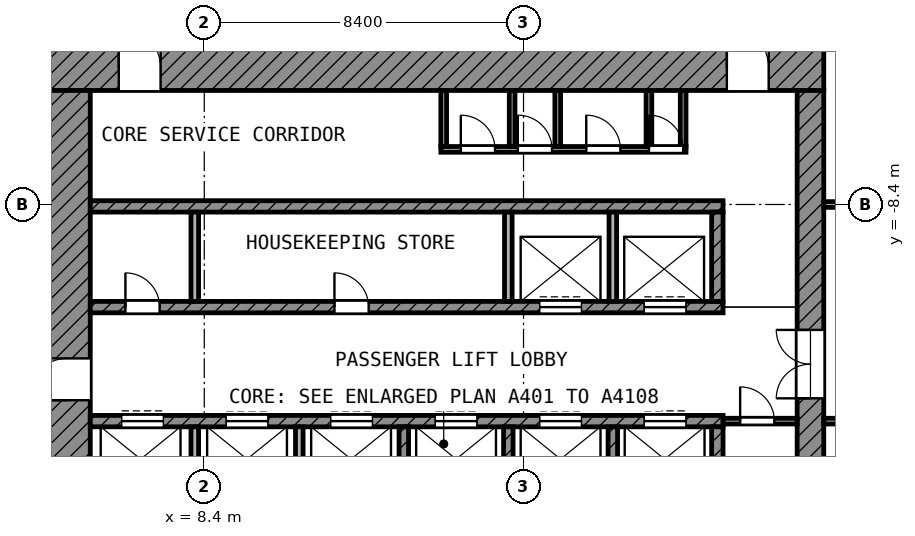
"""IFC4 building model, lengths in metres.
Left out: names, types, materials, properties, quantities, classifications, styles, units other than length and angle.
Written with IfcOpenShell. Run it as: python <this file> out.ifc"""

import sys

from ifc_helpers import new_model, si_unit, direction, frame, frame_2d, origin, place, context, subcontext, project, spatial, rectangle, extrude, element, fill, save


model = new_model("IFC4")
c1 = context("Model", 3, precision=1e-05, world=origin(), true_north=direction((0.0, 1.0)))
c2 = subcontext(c1, "Body", "Model", "MODEL_VIEW")
j1 = project(units=[si_unit("LENGTHUNIT", "METRE"), si_unit("PLANEANGLEUNIT", "RADIAN")], contexts=[c1])
p1 = place(None, origin())
s1 = spatial("IfcSite", under=j1, at=p1, CompositionType="ELEMENT")
p2 = place(p1, origin())
s2 = spatial("IfcBuilding", under=s1, at=p2, CompositionType="ELEMENT")
p3 = place(p2, frame((0.0, 0.0, 277.6)))
s3 = spatial("IfcBuildingStorey", under=s2, at=p3, CompositionType="ELEMENT", Elevation=277.6)
p4 = place(p3, frame((4.2, -4.8, 0.0), z_axis=(0.0, 0.0, 1.0), x_axis=(1.0, 0.0, 0.0)))
e1 = element("IfcWall", 1, at=p4, inside=s3, PredefinedType="SHEAR", context=c2, shape_type="SweptSolid", body=[
    extrude(rectangle(XDim=20.5, YDim=1.2, at=frame_2d((10.25, 0.0))), origin(), (0.0, 0.0, 1.0), 3.6),
])
p5 = place(p4, frame((1.95, 0.0, 0.0)))
e2 = element("IfcOpeningElement", 2, at=p5, cuts=e1, PredefinedType="OPENING", context=c2, shape_type="SweptSolid", body=[
    extrude(rectangle(XDim=1.1, YDim=2.1, at=frame_2d((0.55, 1.05))), frame((0.0, 0.61, 0.0), z_axis=(0.0, -1.0, 0.0), x_axis=(1.0, 0.0, 0.0)), (0.0, 0.0, 1.0), 1.22),
])
p6 = place(p4, frame((17.95, 0.0, 0.0)))
e3 = element("IfcOpeningElement", 3, at=p6, cuts=e1, PredefinedType="OPENING", context=c2, shape_type="SweptSolid", body=[
    extrude(rectangle(XDim=1.1, YDim=2.1, at=frame_2d((0.55, 1.05))), frame((0.0, 0.61, 0.0), z_axis=(0.0, -1.0, 0.0), x_axis=(1.0, 0.0, 0.0)), (0.0, 0.0, 1.0), 1.22),
])
p7 = place(p3, frame((4.8, -24.7, 0.0), z_axis=(0.0, 0.0, 1.0), x_axis=(0.0, 1.0, 0.0)))
e4 = element("IfcWall", 4, at=p7, inside=s3, PredefinedType="SHEAR", context=c2, shape_type="SweptSolid", body=[
    extrude(rectangle(XDim=19.3, YDim=1.2, at=frame_2d((9.65, 0.0))), origin(), (0.0, 0.0, 1.0), 3.6),
])
p8 = place(p7, frame((11.15, 0.0, 0.0)))
e5 = element("IfcOpeningElement", 5, at=p8, cuts=e4, PredefinedType="OPENING", context=c2, shape_type="SweptSolid", body=[
    extrude(rectangle(XDim=1.1, YDim=2.1, at=frame_2d((0.55, 1.05))), frame((0.0, 0.61, 0.0), z_axis=(0.0, -1.0, 0.0), x_axis=(1.0, 0.0, 0.0)), (0.0, 0.0, 1.0), 1.22),
])
p9 = place(p7, frame((1.85, 0.0, 0.0)))
e6 = element("IfcOpeningElement", 6, at=p9, cuts=e4, PredefinedType="OPENING", context=c2, shape_type="SweptSolid", body=[
    extrude(rectangle(XDim=1.1, YDim=2.1, at=frame_2d((0.55, 1.05))), frame((0.0, 0.61, 0.0), z_axis=(0.0, -1.0, 0.0), x_axis=(1.0, 0.0, 0.0)), (0.0, 0.0, 1.0), 1.22),
])
p10 = place(p3, frame((24.35, -24.0, 0.0), z_axis=(0.0, 0.0, 1.0), x_axis=(0.0, 1.0, 0.0)))
e7 = element("IfcWall", 7, at=p10, inside=s3, PredefinedType="SHEAR", context=c2, shape_type="SweptSolid", body=[
    extrude(rectangle(XDim=18.6, YDim=0.7, at=frame_2d((9.3, 0.0))), origin(), (0.0, 0.0, 1.0), 3.6),
])
p11 = place(p10, frame((10.5, 0.0, 0.0)))
e8 = element("IfcOpeningElement", 8, at=p11, cuts=e7, PredefinedType="OPENING", context=c2, shape_type="SweptSolid", body=[
    extrude(rectangle(XDim=1.8, YDim=2.1, at=frame_2d((0.9, 1.05))), frame((0.0, 0.36, 0.0), z_axis=(0.0, -1.0, 0.0), x_axis=(1.0, 0.0, 0.0)), (0.0, 0.0, 1.0), 0.72),
])
p12 = place(p3, frame((5.4, -8.45, 0.0), z_axis=(0.0, 0.0, 1.0), x_axis=(1.0, 0.0, 0.0)))
e9 = element("IfcWall", 9, at=p12, inside=s3, PredefinedType="SHEAR", context=c2, shape_type="SweptSolid", body=[
    extrude(rectangle(XDim=16.65, YDim=0.3, at=frame_2d((8.325, 0.0))), origin(), (0.0, 0.0, 1.0), 3.6),
])
p13 = place(p3, frame((5.4, -11.1, 0.0), z_axis=(0.0, 0.0, 1.0), x_axis=(1.0, 0.0, 0.0)))
e10 = element("IfcWall", 10, at=p13, inside=s3, PredefinedType="SHEAR", context=c2, shape_type="SweptSolid", body=[
    extrude(rectangle(XDim=16.65, YDim=0.3, at=frame_2d((8.325, 0.0))), origin(), (0.0, 0.0, 1.0), 3.6),
])
p14 = place(p13, frame((11.825, 0.0, 0.0)))
e11 = element("IfcOpeningElement", 11, at=p14, cuts=e10, PredefinedType="OPENING", context=c2, shape_type="SweptSolid", body=[
    extrude(rectangle(XDim=1.1, YDim=2.1, at=frame_2d((0.55, 1.05))), frame((0.0, 0.16, 0.0), z_axis=(0.0, -1.0, 0.0), x_axis=(1.0, 0.0, 0.0)), (0.0, 0.0, 1.0), 0.32),
])
p15 = place(p13, frame((14.575, 0.0, 0.0)))
e12 = element("IfcOpeningElement", 12, at=p15, cuts=e10, PredefinedType="OPENING", context=c2, shape_type="SweptSolid", body=[
    extrude(rectangle(XDim=1.1, YDim=2.1, at=frame_2d((0.55, 1.05))), frame((0.0, 0.16, 0.0), z_axis=(0.0, -1.0, 0.0), x_axis=(1.0, 0.0, 0.0)), (0.0, 0.0, 1.0), 0.32),
])
p16 = place(p13, frame((0.925, 0.0, 0.0)))
e13 = element("IfcOpeningElement", 13, at=p16, cuts=e10, PredefinedType="OPENING", context=c2, shape_type="SweptSolid", body=[
    extrude(rectangle(XDim=0.9, YDim=2.1, at=frame_2d((0.45, 1.05))), frame((0.0, 0.16, 0.0), z_axis=(0.0, -1.0, 0.0), x_axis=(1.0, 0.0, 0.0)), (0.0, 0.0, 1.0), 0.32),
])
p17 = place(p13, frame((6.425, 0.0, 0.0)))
e14 = element("IfcOpeningElement", 14, at=p17, cuts=e10, PredefinedType="OPENING", context=c2, shape_type="SweptSolid", body=[
    extrude(rectangle(XDim=0.9, YDim=2.1, at=frame_2d((0.45, 1.05))), frame((0.0, 0.16, 0.0), z_axis=(0.0, -1.0, 0.0), x_axis=(1.0, 0.0, 0.0)), (0.0, 0.0, 1.0), 0.32),
])
p18 = place(p3, frame((5.4, -14.1, 0.0), z_axis=(0.0, 0.0, 1.0), x_axis=(1.0, 0.0, 0.0)))
e15 = element("IfcWall", 15, at=p18, inside=s3, PredefinedType="SHEAR", context=c2, shape_type="SweptSolid", body=[
    extrude(rectangle(XDim=16.65, YDim=0.3, at=frame_2d((8.325, 0.0))), origin(), (0.0, 0.0, 1.0), 3.6),
])
p19 = place(p18, frame((0.825, 0.0, 0.0)))
e16 = element("IfcOpeningElement", 16, at=p19, cuts=e15, PredefinedType="OPENING", context=c2, shape_type="SweptSolid", body=[
    extrude(rectangle(XDim=1.1, YDim=2.1, at=frame_2d((0.55, 1.05))), frame((0.0, 0.16, 0.0), z_axis=(0.0, -1.0, 0.0), x_axis=(1.0, 0.0, 0.0)), (0.0, 0.0, 1.0), 0.32),
])
p20 = place(p18, frame((3.575, 0.0, 0.0)))
e17 = element("IfcOpeningElement", 17, at=p20, cuts=e15, PredefinedType="OPENING", context=c2, shape_type="SweptSolid", body=[
    extrude(rectangle(XDim=1.1, YDim=2.1, at=frame_2d((0.55, 1.05))), frame((0.0, 0.16, 0.0), z_axis=(0.0, -1.0, 0.0), x_axis=(1.0, 0.0, 0.0)), (0.0, 0.0, 1.0), 0.32),
])
p21 = place(p18, frame((6.325, 0.0, 0.0)))
e18 = element("IfcOpeningElement", 18, at=p21, cuts=e15, PredefinedType="OPENING", context=c2, shape_type="SweptSolid", body=[
    extrude(rectangle(XDim=1.1, YDim=2.1, at=frame_2d((0.55, 1.05))), frame((0.0, 0.16, 0.0), z_axis=(0.0, -1.0, 0.0), x_axis=(1.0, 0.0, 0.0)), (0.0, 0.0, 1.0), 0.32),
])
p22 = place(p18, frame((9.075, 0.0, 0.0)))
e19 = element("IfcOpeningElement", 19, at=p22, cuts=e15, PredefinedType="OPENING", context=c2, shape_type="SweptSolid", body=[
    extrude(rectangle(XDim=1.1, YDim=2.1, at=frame_2d((0.55, 1.05))), frame((0.0, 0.16, 0.0), z_axis=(0.0, -1.0, 0.0), x_axis=(1.0, 0.0, 0.0)), (0.0, 0.0, 1.0), 0.32),
])
p23 = place(p18, frame((11.825, 0.0, 0.0)))
e20 = element("IfcOpeningElement", 20, at=p23, cuts=e15, PredefinedType="OPENING", context=c2, shape_type="SweptSolid", body=[
    extrude(rectangle(XDim=1.1, YDim=2.1, at=frame_2d((0.55, 1.05))), frame((0.0, 0.16, 0.0), z_axis=(0.0, -1.0, 0.0), x_axis=(1.0, 0.0, 0.0)), (0.0, 0.0, 1.0), 0.32),
])
p24 = place(p18, frame((14.575, 0.0, 0.0)))
e21 = element("IfcOpeningElement", 21, at=p24, cuts=e15, PredefinedType="OPENING", context=c2, shape_type="SweptSolid", body=[
    extrude(rectangle(XDim=1.1, YDim=2.1, at=frame_2d((0.55, 1.05))), frame((0.0, 0.16, 0.0), z_axis=(0.0, -1.0, 0.0), x_axis=(1.0, 0.0, 0.0)), (0.0, 0.0, 1.0), 0.32),
])
p25 = place(p3, frame((21.9, -10.95, 0.0), z_axis=(0.0, 0.0, 1.0), x_axis=(0.0, 1.0, 0.0)))
e22 = element("IfcWall", 22, at=p25, inside=s3, PredefinedType="SHEAR", context=c2, shape_type="SweptSolid", body=[
    extrude(rectangle(XDim=2.35, YDim=0.3, at=frame_2d((1.175, 0.0))), origin(), (0.0, 0.0, 1.0), 3.6),
])
p26 = place(p3, frame((21.9, -16.6, 0.0), z_axis=(0.0, 0.0, 1.0), x_axis=(0.0, 1.0, 0.0)))
e23 = element("IfcWall", 23, at=p26, inside=s3, PredefinedType="SHEAR", context=c2, shape_type="SweptSolid", body=[
    extrude(rectangle(XDim=2.35, YDim=0.3, at=frame_2d((1.175, 0.0))), origin(), (0.0, 0.0, 1.0), 3.6),
])
for number, where, z_axis, x_axis in (
    (24, (8.15, -10.95, 0.0), (0.0, 0.0, 1.0), (0.0, 1.0, 0.0)),
    (25, (16.4, -10.95, 0.0), (0.0, 0.0, 1.0), (0.0, 1.0, 0.0)),
    (26, (19.15, -10.95, 0.0), (0.0, 0.0, 1.0), (0.0, 1.0, 0.0)),
):
    element("IfcWall", number, at=place(p3, frame(where, z_axis=z_axis, x_axis=x_axis)), inside=s3, PredefinedType="PARTITIONING", context=c2, shape_type="SweptSolid", body=[
        extrude(rectangle(XDim=2.35, YDim=0.2, at=frame_2d((1.175, 0.0))), origin(), (0.0, 0.0, 1.0), 3.6),
    ])
for number, where, z_axis, x_axis in (
    (27, (8.15, -16.6, 0.0), (0.0, 0.0, 1.0), (0.0, 1.0, 0.0)),
    (28, (10.9, -16.6, 0.0), (0.0, 0.0, 1.0), (0.0, 1.0, 0.0)),
):
    element("IfcWall", number, at=place(p3, frame(where, z_axis=z_axis, x_axis=x_axis)), inside=s3, PredefinedType="PARTITIONING", context=c2, shape_type="SweptSolid", body=[
        extrude(rectangle(XDim=2.35, YDim=0.2, at=frame_2d((1.175, 0.0))), origin(), (0.0, 0.0, 1.0), 3.6),
    ])
for number, where, z_axis, x_axis in (
    (29, (13.65, -16.6, 0.0), (0.0, 0.0, 1.0), (0.0, 1.0, 0.0)),
    (30, (16.4, -16.6, 0.0), (0.0, 0.0, 1.0), (0.0, 1.0, 0.0)),
    (31, (19.15, -16.6, 0.0), (0.0, 0.0, 1.0), (0.0, 1.0, 0.0)),
):
    element("IfcWall", number, at=place(p3, frame(where, z_axis=z_axis, x_axis=x_axis)), inside=s3, PredefinedType="SHEAR", context=c2, shape_type="SweptSolid", body=[
        extrude(rectangle(XDim=2.35, YDim=0.25, at=frame_2d((1.175, 0.0))), origin(), (0.0, 0.0, 1.0), 3.6),
    ])
p27 = place(p3, frame((22.05, -14.1, 0.0), z_axis=(0.0, 0.0, 1.0), x_axis=(1.0, 0.0, 0.0)))
e32 = element("IfcWall", 32, at=p27, inside=s3, PredefinedType="PARTITIONING", context=c2, shape_type="SweptSolid", body=[
    extrude(rectangle(XDim=1.95, YDim=0.15, at=frame_2d((0.975, 0.0))), origin(), (0.0, 0.0, 1.0), 3.6),
])
p28 = place(p27, frame((0.45, 0.0, 0.0)))
e33 = element("IfcOpeningElement", 33, at=p28, cuts=e32, PredefinedType="OPENING", context=c2, shape_type="SweptSolid", body=[
    extrude(rectangle(XDim=0.9, YDim=2.1, at=frame_2d((0.45, 1.05))), frame((0.0, 0.085, 0.0), z_axis=(0.0, -1.0, 0.0), x_axis=(1.0, 0.0, 0.0)), (0.0, 0.0, 1.0), 0.17),
])
p29 = place(p3, frame((14.625, -6.95, 0.0), z_axis=(0.0, 0.0, 1.0), x_axis=(1.0, 0.0, 0.0)))
e34 = element("IfcWall", 34, at=p29, inside=s3, PredefinedType="PARTITIONING", context=c2, shape_type="SweptSolid", body=[
    extrude(rectangle(XDim=6.45, YDim=0.15, at=frame_2d((3.225, 0.0))), origin(), (0.0, 0.0, 1.0), 3.6),
])
p30 = place(p29, frame((0.525, 0.0, 0.0)))
e35 = element("IfcOpeningElement", 35, at=p30, cuts=e34, PredefinedType="OPENING", context=c2, shape_type="SweptSolid", body=[
    extrude(rectangle(XDim=0.9, YDim=2.1, at=frame_2d((0.45, 1.05))), frame((0.0, 0.085, 0.0), z_axis=(0.0, -1.0, 0.0), x_axis=(1.0, 0.0, 0.0)), (0.0, 0.0, 1.0), 0.17),
])
p31 = place(p29, frame((2.025, 0.0, 0.0)))
e36 = element("IfcOpeningElement", 36, at=p31, cuts=e34, PredefinedType="OPENING", context=c2, shape_type="SweptSolid", body=[
    extrude(rectangle(XDim=0.9, YDim=2.1, at=frame_2d((0.45, 1.05))), frame((0.0, 0.085, 0.0), z_axis=(0.0, -1.0, 0.0), x_axis=(1.0, 0.0, 0.0)), (0.0, 0.0, 1.0), 0.17),
])
p32 = place(p29, frame((3.825, 0.0, 0.0)))
e37 = element("IfcOpeningElement", 37, at=p32, cuts=e34, PredefinedType="OPENING", context=c2, shape_type="SweptSolid", body=[
    extrude(rectangle(XDim=0.9, YDim=2.1, at=frame_2d((0.45, 1.05))), frame((0.0, 0.085, 0.0), z_axis=(0.0, -1.0, 0.0), x_axis=(1.0, 0.0, 0.0)), (0.0, 0.0, 1.0), 0.17),
])
p33 = place(p29, frame((5.475, 0.0, 0.0)))
e38 = element("IfcOpeningElement", 38, at=p33, cuts=e34, PredefinedType="OPENING", context=c2, shape_type="SweptSolid", body=[
    extrude(rectangle(XDim=0.9, YDim=2.1, at=frame_2d((0.45, 1.05))), frame((0.0, 0.085, 0.0), z_axis=(0.0, -1.0, 0.0), x_axis=(1.0, 0.0, 0.0)), (0.0, 0.0, 1.0), 0.17),
])
for number, where, z_axis, x_axis in (
    (39, (14.7, -6.875, 0.0), (0.0, 0.0, 1.0), (0.0, 1.0, 0.0)),
    (40, (16.5, -6.875, 0.0), (0.0, 0.0, 1.0), (0.0, 1.0, 0.0)),
    (41, (17.7, -6.875, 0.0), (0.0, 0.0, 1.0), (0.0, 1.0, 0.0)),
    (42, (20.1, -6.875, 0.0), (0.0, 0.0, 1.0), (0.0, 1.0, 0.0)),
    (43, (21.0, -6.875, 0.0), (0.0, 0.0, 1.0), (0.0, 1.0, 0.0)),
):
    element("IfcWall", number, at=place(p3, frame(where, z_axis=z_axis, x_axis=x_axis)), inside=s3, PredefinedType="PARTITIONING", context=c2, shape_type="SweptSolid", body=[
        extrude(rectangle(XDim=1.475, YDim=0.15, at=frame_2d((0.738, 0.0))), origin(), (0.0, 0.0, 1.0), 3.6),
    ])
p34 = place(p3, frame((24.7, -14.1, 0.0), z_axis=(0.0, 0.0, 1.0), x_axis=(1.0, 0.0, 0.0)))
e44 = element("IfcWall", 44, at=p34, inside=s3, PredefinedType="PARTITIONING", context=c2, shape_type="SweptSolid", body=[
    extrude(rectangle(XDim=4.625, YDim=0.15, at=frame_2d((2.312, 0.0))), origin(), (0.0, 0.0, 1.0), 3.6),
])
p35 = place(p34, frame((2.1, 0.0, 0.0)))
e45 = element("IfcOpeningElement", 45, at=p35, cuts=e44, PredefinedType="OPENING", context=c2, shape_type="SweptSolid", body=[
    extrude(rectangle(XDim=1.0, YDim=2.1, at=frame_2d((0.5, 1.05))), frame((0.0, 0.085, 0.0), z_axis=(0.0, -1.0, 0.0), x_axis=(1.0, 0.0, 0.0)), (0.0, 0.0, 1.0), 0.17),
])
p36 = place(p3, frame((24.7, -8.4, 0.0), z_axis=(0.0, 0.0, 1.0), x_axis=(1.0, 0.0, 0.0)))
e46 = element("IfcWall", 46, at=p36, inside=s3, PredefinedType="PARTITIONING", context=c2, shape_type="SweptSolid", body=[
    extrude(rectangle(XDim=15.657, YDim=0.15, at=frame_2d((7.829, 0.0))), origin(), (0.0, 0.0, 1.0), 3.6),
])
p37 = place(p36, frame((1.05, 0.0, 0.0)))
e47 = element("IfcOpeningElement", 47, at=p37, cuts=e46, PredefinedType="OPENING", context=c2, shape_type="SweptSolid", body=[
    extrude(rectangle(XDim=1.0, YDim=2.1, at=frame_2d((0.5, 1.05))), frame((0.0, 0.085, 0.0), z_axis=(0.0, -1.0, 0.0), x_axis=(1.0, 0.0, 0.0)), (0.0, 0.0, 1.0), 0.17),
])
p38 = place(p36, frame((9.379, 0.0, 0.0)))
e48 = element("IfcOpeningElement", 48, at=p38, cuts=e46, PredefinedType="OPENING", context=c2, shape_type="SweptSolid", body=[
    extrude(rectangle(XDim=1.5, YDim=2.1, at=frame_2d((0.75, 1.05))), frame((0.0, 0.085, 0.0), z_axis=(0.0, -1.0, 0.0), x_axis=(1.0, 0.0, 0.0)), (0.0, 0.0, 1.0), 0.17),
])
p39 = place(p14, origin())
e49 = element("IfcDoor", 49, at=p39, inside=s3, OperationType="DOUBLE_DOOR_SLIDING", PredefinedType="DOOR", context=c2, shape_type="SweptSolid", body=[
    extrude(rectangle(XDim=1.1, YDim=2.1, at=frame_2d((0.55, 1.05))), frame((0.0, 0.025, 0.0), z_axis=(0.0, -1.0, 0.0), x_axis=(1.0, 0.0, 0.0)), (0.0, 0.0, 1.0), 0.05),
])
fill(e11, e49)
p40 = place(p15, origin())
e50 = element("IfcDoor", 50, at=p40, inside=s3, OperationType="DOUBLE_DOOR_SLIDING", PredefinedType="DOOR", context=c2, shape_type="SweptSolid", body=[
    extrude(rectangle(XDim=1.1, YDim=2.1, at=frame_2d((0.55, 1.05))), frame((0.0, 0.025, 0.0), z_axis=(0.0, -1.0, 0.0), x_axis=(1.0, 0.0, 0.0)), (0.0, 0.0, 1.0), 0.05),
])
fill(e12, e50)
p41 = place(p19, origin())
e51 = element("IfcDoor", 51, at=p41, inside=s3, OperationType="DOUBLE_DOOR_SLIDING", PredefinedType="DOOR", context=c2, shape_type="SweptSolid", body=[
    extrude(rectangle(XDim=1.1, YDim=2.1, at=frame_2d((0.55, 1.05))), frame((0.0, 0.025, 0.0), z_axis=(0.0, -1.0, 0.0), x_axis=(1.0, 0.0, 0.0)), (0.0, 0.0, 1.0), 0.05),
])
fill(e16, e51)
p42 = place(p20, origin())
e52 = element("IfcDoor", 52, at=p42, inside=s3, OperationType="DOUBLE_DOOR_SLIDING", PredefinedType="DOOR", context=c2, shape_type="SweptSolid", body=[
    extrude(rectangle(XDim=1.1, YDim=2.1, at=frame_2d((0.55, 1.05))), frame((0.0, 0.025, 0.0), z_axis=(0.0, -1.0, 0.0), x_axis=(1.0, 0.0, 0.0)), (0.0, 0.0, 1.0), 0.05),
])
fill(e17, e52)
p43 = place(p21, origin())
e53 = element("IfcDoor", 53, at=p43, inside=s3, OperationType="DOUBLE_DOOR_SLIDING", PredefinedType="DOOR", context=c2, shape_type="SweptSolid", body=[
    extrude(rectangle(XDim=1.1, YDim=2.1, at=frame_2d((0.55, 1.05))), frame((0.0, 0.025, 0.0), z_axis=(0.0, -1.0, 0.0), x_axis=(1.0, 0.0, 0.0)), (0.0, 0.0, 1.0), 0.05),
])
fill(e18, e53)
p44 = place(p22, origin())
e54 = element("IfcDoor", 54, at=p44, inside=s3, OperationType="DOUBLE_DOOR_SLIDING", PredefinedType="DOOR", context=c2, shape_type="SweptSolid", body=[
    extrude(rectangle(XDim=1.1, YDim=2.1, at=frame_2d((0.55, 1.05))), frame((0.0, 0.025, 0.0), z_axis=(0.0, -1.0, 0.0), x_axis=(1.0, 0.0, 0.0)), (0.0, 0.0, 1.0), 0.05),
])
fill(e19, e54)
p45 = place(p23, origin())
e55 = element("IfcDoor", 55, at=p45, inside=s3, OperationType="DOUBLE_DOOR_SLIDING", PredefinedType="DOOR", context=c2, shape_type="SweptSolid", body=[
    extrude(rectangle(XDim=1.1, YDim=2.1, at=frame_2d((0.55, 1.05))), frame((0.0, 0.025, 0.0), z_axis=(0.0, -1.0, 0.0), x_axis=(1.0, 0.0, 0.0)), (0.0, 0.0, 1.0), 0.05),
])
fill(e20, e55)
p46 = place(p24, origin())
e56 = element("IfcDoor", 56, at=p46, inside=s3, OperationType="DOUBLE_DOOR_SLIDING", PredefinedType="DOOR", context=c2, shape_type="SweptSolid", body=[
    extrude(rectangle(XDim=1.1, YDim=2.1, at=frame_2d((0.55, 1.05))), frame((0.0, 0.025, 0.0), z_axis=(0.0, -1.0, 0.0), x_axis=(1.0, 0.0, 0.0)), (0.0, 0.0, 1.0), 0.05),
])
fill(e21, e56)
p47 = place(p8, origin())
e57 = element("IfcDoor", 57, at=p47, inside=s3, OperationType="SINGLE_SWING_LEFT", PredefinedType="DOOR", context=c2, shape_type="SweptSolid", body=[
    extrude(rectangle(XDim=1.1, YDim=2.1, at=frame_2d((0.55, 1.05))), frame((0.0, 0.025, 0.0), z_axis=(0.0, -1.0, 0.0), x_axis=(1.0, 0.0, 0.0)), (0.0, 0.0, 1.0), 0.05),
])
fill(e5, e57)
p48 = place(p5, origin())
e58 = element("IfcDoor", 58, at=p48, inside=s3, OperationType="SINGLE_SWING_LEFT", PredefinedType="DOOR", context=c2, shape_type="SweptSolid", body=[
    extrude(rectangle(XDim=1.1, YDim=2.1, at=frame_2d((0.55, 1.05))), frame((0.0, 0.025, 0.0), z_axis=(0.0, -1.0, 0.0), x_axis=(1.0, 0.0, 0.0)), (0.0, 0.0, 1.0), 0.05),
])
fill(e2, e58)
p49 = place(p6, origin())
e59 = element("IfcDoor", 59, at=p49, inside=s3, OperationType="SINGLE_SWING_LEFT", PredefinedType="DOOR", context=c2, shape_type="SweptSolid", body=[
    extrude(rectangle(XDim=1.1, YDim=2.1, at=frame_2d((0.55, 1.05))), frame((0.0, 0.025, 0.0), z_axis=(0.0, -1.0, 0.0), x_axis=(1.0, 0.0, 0.0)), (0.0, 0.0, 1.0), 0.05),
])
fill(e3, e59)
p50 = place(p11, origin())
e60 = element("IfcDoor", 60, at=p50, inside=s3, OperationType="DOUBLE_DOOR_SINGLE_SWING", PredefinedType="DOOR", context=c2, shape_type="SweptSolid", body=[
    extrude(rectangle(XDim=1.8, YDim=2.1, at=frame_2d((0.9, 1.05))), frame((0.0, 0.025, 0.0), z_axis=(0.0, -1.0, 0.0), x_axis=(1.0, 0.0, 0.0)), (0.0, 0.0, 1.0), 0.05),
])
fill(e8, e60)
p51 = place(p30, origin())
e61 = element("IfcDoor", 61, at=p51, inside=s3, OperationType="SINGLE_SWING_LEFT", PredefinedType="DOOR", context=c2, shape_type="SweptSolid", body=[
    extrude(rectangle(XDim=0.9, YDim=2.1, at=frame_2d((0.45, 1.05))), frame((0.0, 0.025, 0.0), z_axis=(0.0, -1.0, 0.0), x_axis=(1.0, 0.0, 0.0)), (0.0, 0.0, 1.0), 0.05),
])
fill(e35, e61)
p52 = place(p31, origin())
e62 = element("IfcDoor", 62, at=p52, inside=s3, OperationType="SINGLE_SWING_LEFT", PredefinedType="DOOR", context=c2, shape_type="SweptSolid", body=[
    extrude(rectangle(XDim=0.9, YDim=2.1, at=frame_2d((0.45, 1.05))), frame((0.0, 0.025, 0.0), z_axis=(0.0, -1.0, 0.0), x_axis=(1.0, 0.0, 0.0)), (0.0, 0.0, 1.0), 0.05),
])
fill(e36, e62)
p53 = place(p32, origin())
e63 = element("IfcDoor", 63, at=p53, inside=s3, OperationType="SINGLE_SWING_LEFT", PredefinedType="DOOR", context=c2, shape_type="SweptSolid", body=[
    extrude(rectangle(XDim=0.9, YDim=2.1, at=frame_2d((0.45, 1.05))), frame((0.0, 0.025, 0.0), z_axis=(0.0, -1.0, 0.0), x_axis=(1.0, 0.0, 0.0)), (0.0, 0.0, 1.0), 0.05),
])
fill(e37, e63)
p54 = place(p33, origin())
e64 = element("IfcDoor", 64, at=p54, inside=s3, OperationType="SINGLE_SWING_LEFT", PredefinedType="DOOR", context=c2, shape_type="SweptSolid", body=[
    extrude(rectangle(XDim=0.9, YDim=2.1, at=frame_2d((0.45, 1.05))), frame((0.0, 0.025, 0.0), z_axis=(0.0, -1.0, 0.0), x_axis=(1.0, 0.0, 0.0)), (0.0, 0.0, 1.0), 0.05),
])
fill(e38, e64)
p55 = place(p28, origin())
e65 = element("IfcDoor", 65, at=p55, inside=s3, OperationType="SINGLE_SWING_LEFT", PredefinedType="DOOR", context=c2, shape_type="SweptSolid", body=[
    extrude(rectangle(XDim=0.9, YDim=2.1, at=frame_2d((0.45, 1.05))), frame((0.0, 0.025, 0.0), z_axis=(0.0, -1.0, 0.0), x_axis=(1.0, 0.0, 0.0)), (0.0, 0.0, 1.0), 0.05),
])
fill(e33, e65)
p56 = place(p16, origin())
e66 = element("IfcDoor", 66, at=p56, inside=s3, OperationType="SINGLE_SWING_LEFT", PredefinedType="DOOR", context=c2, shape_type="SweptSolid", body=[
    extrude(rectangle(XDim=0.9, YDim=2.1, at=frame_2d((0.45, 1.05))), frame((0.0, 0.025, 0.0), z_axis=(0.0, -1.0, 0.0), x_axis=(1.0, 0.0, 0.0)), (0.0, 0.0, 1.0), 0.05),
])
fill(e13, e66)
p57 = place(p17, origin())
e67 = element("IfcDoor", 67, at=p57, inside=s3, OperationType="SINGLE_SWING_LEFT", PredefinedType="DOOR", context=c2, shape_type="SweptSolid", body=[
    extrude(rectangle(XDim=0.9, YDim=2.1, at=frame_2d((0.45, 1.05))), frame((0.0, 0.025, 0.0), z_axis=(0.0, -1.0, 0.0), x_axis=(1.0, 0.0, 0.0)), (0.0, 0.0, 1.0), 0.05),
])
fill(e14, e67)
save(model, sys.argv[1])
